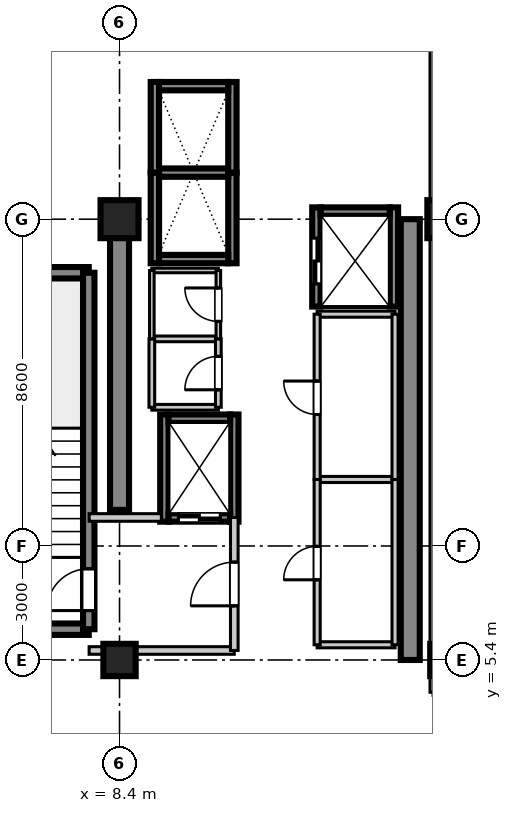
"""IFC4 building model, lengths in metres.
Left out: names, types, materials, properties, quantities, classifications, styles, units other than length and angle.
Written with IfcOpenShell. Run it as: python <this file> out.ifc"""

import sys

from ifc_helpers import new_model, si_unit, direction, frame, frame_2d, origin, origin_2d, place, context, subcontext, project, spatial, rectangle, extrude, source, transform, mapped, element, fill, save


model = new_model("IFC4")
c1 = context("Model", 3, precision=1e-05, world=origin(), true_north=direction((0.0, 1.0)))
c2 = subcontext(c1, "Body", "Model", "MODEL_VIEW")
j1 = project(units=[si_unit("LENGTHUNIT", "METRE"), si_unit("PLANEANGLEUNIT", "RADIAN")], contexts=[c1])
p1 = place(None, origin())
s1 = spatial("IfcSite", under=j1, at=p1, CompositionType="ELEMENT")
p2 = place(p1, origin())
s2 = spatial("IfcBuilding", under=s1, at=p2, CompositionType="ELEMENT")
p3 = place(p2, frame((0.0, 0.0, 219.7)))
s3 = spatial("IfcBuildingStorey", under=s2, at=p3, CompositionType="ELEMENT", Elevation=219.7)
m1 = source(origin(), c2, "Body", "SweptSolid", [
    extrude(rectangle(XDim=0.85, YDim=0.85, at=origin_2d()), origin(), (0.0, 0.0, 1.0), 3.655),
])
p4 = place(p3, frame((8.4, 5.4, 0.0), z_axis=(0.0, 0.0, 1.0), x_axis=(1.0, 0.0, 0.0)))
e1 = element("IfcColumn", 1, at=p4, inside=s3, PredefinedType="PILASTER", context=c2, shape_type="MappedRepresentation", body=[
    mapped(m1, transform((0.0, 0.0, 0.0), scale=1.0)),
])
m2 = source(origin(), c2, "Body", "SweptSolid", [
    extrude(rectangle(XDim=1.0, YDim=1.0, at=origin_2d()), origin(), (0.0, 0.0, 1.0), 3.655),
])
p5 = place(p3, frame((8.4, 17.0, 0.0), z_axis=(0.0, 0.0, 1.0), x_axis=(1.0, 0.0, 0.0)))
e2 = element("IfcColumn", 2, at=p5, inside=s3, PredefinedType="COLUMN", context=c2, shape_type="MappedRepresentation", body=[
    mapped(m2, transform((0.0, 0.0, 0.0), scale=1.0)),
])
p6 = place(p3, frame((17.0, 5.4, 0.0), z_axis=(0.0, 0.0, 1.0), x_axis=(1.0, 0.0, 0.0)))
e3 = element("IfcColumn", 3, at=p6, inside=s3, PredefinedType="PILASTER", context=c2, shape_type="MappedRepresentation", body=[
    mapped(m1, transform((0.0, 0.0, 0.0), scale=1.0)),
])
p7 = place(p3, frame((17.0, 17.0, 0.0), z_axis=(0.0, 0.0, 1.0), x_axis=(1.0, 0.0, 0.0)))
e4 = element("IfcColumn", 4, at=p7, inside=s3, PredefinedType="COLUMN", context=c2, shape_type="MappedRepresentation", body=[
    mapped(m2, transform((0.0, 0.0, 0.0), scale=1.0)),
])
m3 = source(origin(), c2, "Body", "SweptSolid", [
    extrude(rectangle(XDim=7.65, YDim=0.5, at=frame_2d((3.825, 0.0))), origin(), (0.0, 0.0, 1.0), 3.41),
])
p8 = place(p3, frame((8.4, 9.35, 0.0), z_axis=(0.0, 0.0, 1.0), x_axis=(0.0, 1.0, 0.0)))
e5 = element("IfcWall", 5, at=p8, inside=s3, PredefinedType="SHEAR", context=c2, shape_type="MappedRepresentation", body=[
    mapped(m3, transform((0.0, 0.0, 0.0), scale=1.0)),
])
m4 = source(origin(), c2, "Body", "SweptSolid", [
    extrude(rectangle(XDim=11.6, YDim=0.5, at=frame_2d((5.8, 0.0))), origin(), (0.0, 0.0, 1.0), 3.41),
])
p9 = place(p3, frame((16.05, 5.4, 0.0), z_axis=(0.0, 0.0, 1.0), x_axis=(0.0, 1.0, 0.0)))
e6 = element("IfcWall", 6, at=p9, inside=s3, PredefinedType="SHEAR", context=c2, shape_type="MappedRepresentation", body=[
    mapped(m4, transform((0.0, 0.0, 0.0), scale=1.0)),
])
m5 = source(origin(), c2, "Body", "SweptSolid", [
    extrude(rectangle(XDim=3.98, YDim=0.3, at=frame_2d((1.99, 0.0))), origin(), (0.0, 0.0, 1.0), 3.41),
])
for number, where, z_axis, x_axis in (
    (7, (3.61, 6.21, 0.0), (0.0, 0.0, 1.0), (1.0, 0.0, 0.0)),
    (8, (3.61, 15.59, 0.0), (0.0, 0.0, 1.0), (1.0, 0.0, 0.0)),
):
    element("IfcWall", number, at=place(p3, frame(where, z_axis=z_axis, x_axis=x_axis)), inside=s3, PredefinedType="SHEAR", context=c2, shape_type="MappedRepresentation", body=[
        mapped(m5, transform((0.0, 0.0, 0.0), scale=1.0)),
    ])
m6 = source(origin(), c2, "Body", "SweptSolid", [
    extrude(rectangle(XDim=9.38, YDim=0.3, at=frame_2d((4.69, 0.0))), origin(), (0.0, 0.0, 1.0), 3.41),
])
p10 = place(p3, frame((7.59, 6.21, 0.0), z_axis=(0.0, 0.0, 1.0), x_axis=(0.0, 1.0, 0.0)))
e9 = element("IfcWall", 9, at=p10, inside=s3, PredefinedType="SHEAR", context=c2, shape_type="MappedRepresentation", body=[
    mapped(m6, transform((0.0, 0.0, 0.0), scale=1.0)),
])
p11 = place(p10, frame((0.49, 0.0, 0.0)))
e10 = element("IfcOpeningElement", 10, at=p11, cuts=e9, PredefinedType="OPENING", context=c2, shape_type="SweptSolid", body=[
    extrude(rectangle(XDim=1.1, YDim=2.15, at=frame_2d((0.55, 1.075))), frame((0.0, 0.16, 0.0), z_axis=(0.0, -1.0, 0.0), x_axis=(1.0, 0.0, 0.0)), (0.0, 0.0, 1.0), 0.32),
])
m7 = source(origin(), c2, "Body", "SweptSolid", [
    extrude(rectangle(XDim=2.385, YDim=0.22, at=frame_2d((1.192, 0.0))), origin(), (0.0, 0.0, 1.0), 3.41),
])
for number, where, z_axis, x_axis in (
    (11, (9.33, 15.84, 0.0), (0.0, 0.0, 1.0), (0.0, 1.0, 0.0)),
    (12, (11.37, 15.84, 0.0), (0.0, 0.0, 1.0), (0.0, 1.0, 0.0)),
):
    element("IfcWall", number, at=place(p3, frame(where, z_axis=z_axis, x_axis=x_axis)), inside=s3, PredefinedType="SHEAR", context=c2, shape_type="MappedRepresentation", body=[
        mapped(m7, transform((0.0, 0.0, 0.0), scale=1.0)),
    ])
m8 = source(origin(), c2, "Body", "SweptSolid", [
    extrude(rectangle(XDim=1.82, YDim=0.22, at=frame_2d((0.91, 0.0))), origin(), (0.0, 0.0, 1.0), 3.41),
])
p12 = place(p3, frame((9.44, 15.95, 0.0), z_axis=(0.0, 0.0, 1.0), x_axis=(1.0, 0.0, 0.0)))
e13 = element("IfcWall", 13, at=p12, inside=s3, PredefinedType="SHEAR", context=c2, shape_type="MappedRepresentation", body=[
    mapped(m8, transform((0.0, 0.0, 0.0), scale=1.0)),
])
m9 = source(origin(), c2, "Body", "SweptSolid", [
    extrude(rectangle(XDim=1.82, YDim=0.22, at=frame_2d((0.91, 0.0))), origin(), (0.0, 0.0, 1.0), 3.7),
])
p13 = place(p3, frame((9.44, 18.225, 0.0), z_axis=(0.0, 0.0, 1.0), x_axis=(1.0, 0.0, 0.0)))
e14 = element("IfcWall", 14, at=p13, inside=s3, PredefinedType="SHEAR", context=c2, shape_type="MappedRepresentation", body=[
    mapped(m9, transform((0.0, 0.0, 0.0), scale=1.0)),
])
for number, where, z_axis, x_axis in (
    (15, (9.33, 18.225, 0.0), (0.0, 0.0, 1.0), (0.0, 1.0, 0.0)),
    (16, (11.37, 18.225, 0.0), (0.0, 0.0, 1.0), (0.0, 1.0, 0.0)),
):
    element("IfcWall", number, at=place(p3, frame(where, z_axis=z_axis, x_axis=x_axis)), inside=s3, PredefinedType="SHEAR", context=c2, shape_type="MappedRepresentation", body=[
        mapped(m7, transform((0.0, 0.0, 0.0), scale=1.0)),
    ])
p14 = place(p3, frame((9.44, 20.5, 0.0), z_axis=(0.0, 0.0, 1.0), x_axis=(1.0, 0.0, 0.0)))
e17 = element("IfcWall", 17, at=p14, inside=s3, PredefinedType="SHEAR", context=c2, shape_type="MappedRepresentation", body=[
    mapped(m8, transform((0.0, 0.0, 0.0), scale=1.0)),
])
m10 = source(origin(), c2, "Body", "SweptSolid", [
    extrude(rectangle(XDim=2.82, YDim=0.22, at=frame_2d((1.41, 0.0))), origin(), (0.0, 0.0, 1.0), 3.41),
])
for number, where, z_axis, x_axis in (
    (18, (9.58, 9.04, 0.0), (0.0, 0.0, 1.0), (0.0, 1.0, 0.0)),
    (19, (11.42, 9.04, 0.0), (0.0, 0.0, 1.0), (0.0, 1.0, 0.0)),
):
    element("IfcWall", number, at=place(p3, frame(where, z_axis=z_axis, x_axis=x_axis)), inside=s3, PredefinedType="SHEAR", context=c2, shape_type="MappedRepresentation", body=[
        mapped(m10, transform((0.0, 0.0, 0.0), scale=1.0)),
    ])
m11 = source(origin(), c2, "Body", "SweptSolid", [
    extrude(rectangle(XDim=1.62, YDim=0.22, at=frame_2d((0.81, 0.0))), origin(), (0.0, 0.0, 1.0), 3.41),
])
p15 = place(p3, frame((9.69, 9.15, 0.0), z_axis=(0.0, 0.0, 1.0), x_axis=(1.0, 0.0, 0.0)))
e20 = element("IfcWall", 20, at=p15, inside=s3, PredefinedType="SHEAR", context=c2, shape_type="MappedRepresentation", body=[
    mapped(m11, transform((0.0, 0.0, 0.0), scale=1.0)),
])
p16 = place(p15, frame((0.26, 0.0, 0.0)))
e21 = element("IfcOpeningElement", 21, at=p16, cuts=e20, PredefinedType="OPENING", context=c2, shape_type="SweptSolid", body=[
    extrude(rectangle(XDim=1.1, YDim=2.2, at=frame_2d((0.55, 1.1))), frame((0.0, 0.12, 0.0), z_axis=(0.0, -1.0, 0.0), x_axis=(1.0, 0.0, 0.0)), (0.0, 0.0, 1.0), 0.24),
])
p17 = place(p3, frame((9.69, 11.75, 0.0), z_axis=(0.0, 0.0, 1.0), x_axis=(1.0, 0.0, 0.0)))
e22 = element("IfcWall", 22, at=p17, inside=s3, PredefinedType="SHEAR", context=c2, shape_type="MappedRepresentation", body=[
    mapped(m11, transform((0.0, 0.0, 0.0), scale=1.0)),
])
m12 = source(origin(), c2, "Body", "SweptSolid", [
    extrude(rectangle(XDim=2.61, YDim=0.22, at=frame_2d((1.305, 0.0))), origin(), (0.0, 0.0, 1.0), 3.41),
])
p18 = place(p3, frame((13.58, 14.7, 0.0), z_axis=(0.0, 0.0, 1.0), x_axis=(0.0, 1.0, 0.0)))
e23 = element("IfcWall", 23, at=p18, inside=s3, PredefinedType="SHEAR", context=c2, shape_type="MappedRepresentation", body=[
    mapped(m12, transform((0.0, 0.0, 0.0), scale=1.0)),
])
p19 = place(p18, frame((0.6, 0.0, 0.0)))
e24 = element("IfcOpeningElement", 24, at=p19, cuts=e23, PredefinedType="OPENING", context=c2, shape_type="SweptSolid", body=[
    extrude(rectangle(XDim=1.2, YDim=2.2, at=frame_2d((0.6, 1.1))), frame((0.0, 0.12, 0.0), z_axis=(0.0, -1.0, 0.0), x_axis=(1.0, 0.0, 0.0)), (0.0, 0.0, 1.0), 0.24),
])
p20 = place(p3, frame((15.62, 14.7, 0.0), z_axis=(0.0, 0.0, 1.0), x_axis=(0.0, 1.0, 0.0)))
e25 = element("IfcWall", 25, at=p20, inside=s3, PredefinedType="SHEAR", context=c2, shape_type="MappedRepresentation", body=[
    mapped(m12, transform((0.0, 0.0, 0.0), scale=1.0)),
])
p21 = place(p3, frame((13.69, 17.2, 0.0), z_axis=(0.0, 0.0, 1.0), x_axis=(1.0, 0.0, 0.0)))
e26 = element("IfcWall", 26, at=p21, inside=s3, PredefinedType="SHEAR", context=c2, shape_type="MappedRepresentation", body=[
    mapped(m8, transform((0.0, 0.0, 0.0), scale=1.0)),
])
m13 = source(origin(), c2, "Body", "SweptSolid", [
    extrude(rectangle(XDim=3.82, YDim=0.2, at=frame_2d((1.91, 0.0))), origin(), (0.0, 0.0, 1.0), 2.75),
])
p22 = place(p3, frame((7.6, 5.65, 0.0), z_axis=(0.0, 0.0, 1.0), x_axis=(1.0, 0.0, 0.0)))
e27 = element("IfcWall", 27, at=p22, inside=s3, PredefinedType="PARTITIONING", context=c2, shape_type="MappedRepresentation", body=[
    mapped(m13, transform((0.0, 0.0, 0.0), scale=1.0)),
])
m14 = source(origin(), c2, "Body", "SweptSolid", [
    extrude(rectangle(XDim=1.9, YDim=0.2, at=frame_2d((0.95, 0.0))), origin(), (0.0, 0.0, 1.0), 2.75),
])
p23 = place(p3, frame((7.6, 9.15, 0.0), z_axis=(0.0, 0.0, 1.0), x_axis=(1.0, 0.0, 0.0)))
e28 = element("IfcWall", 28, at=p23, inside=s3, PredefinedType="PARTITIONING", context=c2, shape_type="MappedRepresentation", body=[
    mapped(m14, transform((0.0, 0.0, 0.0), scale=1.0)),
])
m15 = source(origin(), c2, "Body", "SweptSolid", [
    extrude(rectangle(XDim=3.5, YDim=0.2, at=frame_2d((1.75, 0.0))), origin(), (0.0, 0.0, 1.0), 2.75),
])
p24 = place(p3, frame((11.42, 5.65, 0.0), z_axis=(0.0, 0.0, 1.0), x_axis=(0.0, 1.0, 0.0)))
e29 = element("IfcWall", 29, at=p24, inside=s3, PredefinedType="PARTITIONING", context=c2, shape_type="MappedRepresentation", body=[
    mapped(m15, transform((0.0, 0.0, 0.0), scale=1.0)),
])
p25 = place(p24, frame((1.175, 0.0, 0.0)))
e30 = element("IfcOpeningElement", 30, at=p25, cuts=e29, PredefinedType="OPENING", context=c2, shape_type="SweptSolid", body=[
    extrude(rectangle(XDim=1.15, YDim=2.15, at=frame_2d((0.575, 1.075))), frame((0.0, 0.11, 0.0), z_axis=(0.0, -1.0, 0.0), x_axis=(1.0, 0.0, 0.0)), (0.0, 0.0, 1.0), 0.22),
])
m16 = source(origin(), c2, "Body", "SweptSolid", [
    extrude(rectangle(XDim=1.75, YDim=0.15, at=frame_2d((0.875, 0.0))), origin(), (0.0, 0.0, 1.0), 2.75),
])
for number, where, z_axis, x_axis in (
    (31, (9.25, 12.05, 0.0), (0.0, 0.0, 1.0), (1.0, 0.0, 0.0)),
    (32, (9.25, 13.85, 0.0), (0.0, 0.0, 1.0), (1.0, 0.0, 0.0)),
):
    element("IfcWall", number, at=place(p3, frame(where, z_axis=z_axis, x_axis=x_axis)), inside=s3, PredefinedType="PARTITIONING", context=c2, shape_type="MappedRepresentation", body=[
        mapped(m16, transform((0.0, 0.0, 0.0), scale=1.0)),
    ])
m17 = source(origin(), c2, "Body", "SweptSolid", [
    extrude(rectangle(XDim=1.8, YDim=0.15, at=frame_2d((0.9, 0.0))), origin(), (0.0, 0.0, 1.0), 2.75),
])
p26 = place(p3, frame((9.25, 12.05, 0.0), z_axis=(0.0, 0.0, 1.0), x_axis=(0.0, 1.0, 0.0)))
e33 = element("IfcWall", 33, at=p26, inside=s3, PredefinedType="PARTITIONING", context=c2, shape_type="MappedRepresentation", body=[
    mapped(m17, transform((0.0, 0.0, 0.0), scale=1.0)),
])
p27 = place(p3, frame((11.0, 12.05, 0.0), z_axis=(0.0, 0.0, 1.0), x_axis=(0.0, 1.0, 0.0)))
e34 = element("IfcWall", 34, at=p27, inside=s3, PredefinedType="PARTITIONING", context=c2, shape_type="MappedRepresentation", body=[
    mapped(m17, transform((0.0, 0.0, 0.0), scale=1.0)),
])
p28 = place(p27, frame((0.46, 0.0, 0.0)))
e35 = element("IfcOpeningElement", 35, at=p28, cuts=e34, PredefinedType="OPENING", context=c2, shape_type="SweptSolid", body=[
    extrude(rectangle(XDim=0.88, YDim=2.1, at=frame_2d((0.44, 1.05))), frame((0.0, 0.085, 0.0), z_axis=(0.0, -1.0, 0.0), x_axis=(1.0, 0.0, 0.0)), (0.0, 0.0, 1.0), 0.17),
])
m18 = source(origin(), c2, "Body", "SweptSolid", [
    extrude(rectangle(XDim=1.75, YDim=0.12, at=frame_2d((0.875, 0.0))), origin(), (0.0, 0.0, 1.0), 2.75),
])
p29 = place(p3, frame((9.25, 15.65, 0.0), z_axis=(0.0, 0.0, 1.0), x_axis=(1.0, 0.0, 0.0)))
e36 = element("IfcWall", 36, at=p29, inside=s3, PredefinedType="PARTITIONING", context=c2, shape_type="MappedRepresentation", body=[
    mapped(m18, transform((0.0, 0.0, 0.0), scale=1.0)),
])
m19 = source(origin(), c2, "Body", "SweptSolid", [
    extrude(rectangle(XDim=1.8, YDim=0.12, at=frame_2d((0.9, 0.0))), origin(), (0.0, 0.0, 1.0), 2.75),
])
p30 = place(p3, frame((9.25, 13.85, 0.0), z_axis=(0.0, 0.0, 1.0), x_axis=(0.0, 1.0, 0.0)))
e37 = element("IfcWall", 37, at=p30, inside=s3, PredefinedType="PARTITIONING", context=c2, shape_type="MappedRepresentation", body=[
    mapped(m19, transform((0.0, 0.0, 0.0), scale=1.0)),
])
p31 = place(p3, frame((11.0, 13.85, 0.0), z_axis=(0.0, 0.0, 1.0), x_axis=(0.0, 1.0, 0.0)))
e38 = element("IfcWall", 38, at=p31, inside=s3, PredefinedType="PARTITIONING", context=c2, shape_type="MappedRepresentation", body=[
    mapped(m19, transform((0.0, 0.0, 0.0), scale=1.0)),
])
p32 = place(p31, frame((0.46, 0.0, 0.0)))
e39 = element("IfcOpeningElement", 39, at=p32, cuts=e38, PredefinedType="OPENING", context=c2, shape_type="SweptSolid", body=[
    extrude(rectangle(XDim=0.88, YDim=2.1, at=frame_2d((0.44, 1.05))), frame((0.0, 0.07, 0.0), z_axis=(0.0, -1.0, 0.0), x_axis=(1.0, 0.0, 0.0)), (0.0, 0.0, 1.0), 0.14),
])
m20 = source(origin(), c2, "Body", "SweptSolid", [
    extrude(rectangle(XDim=2.05, YDim=0.16, at=frame_2d((1.025, 0.0))), origin(), (0.0, 0.0, 1.0), 2.75),
])
for number, where, z_axis, x_axis in (
    (40, (13.6, 5.8, 0.0), (0.0, 0.0, 1.0), (1.0, 0.0, 0.0)),
    (41, (13.6, 10.15, 0.0), (0.0, 0.0, 1.0), (1.0, 0.0, 0.0)),
):
    element("IfcWall", number, at=place(p3, frame(where, z_axis=z_axis, x_axis=x_axis)), inside=s3, PredefinedType="PARTITIONING", context=c2, shape_type="MappedRepresentation", body=[
        mapped(m20, transform((0.0, 0.0, 0.0), scale=1.0)),
    ])
m21 = source(origin(), c2, "Body", "SweptSolid", [
    extrude(rectangle(XDim=4.35, YDim=0.16, at=frame_2d((2.175, 0.0))), origin(), (0.0, 0.0, 1.0), 2.75),
])
p33 = place(p3, frame((13.6, 5.8, 0.0), z_axis=(0.0, 0.0, 1.0), x_axis=(0.0, 1.0, 0.0)))
e42 = element("IfcWall", 42, at=p33, inside=s3, PredefinedType="PARTITIONING", context=c2, shape_type="MappedRepresentation", body=[
    mapped(m21, transform((0.0, 0.0, 0.0), scale=1.0)),
])
p34 = place(p33, frame((1.71, 0.0, 0.0)))
e43 = element("IfcOpeningElement", 43, at=p34, cuts=e42, PredefinedType="OPENING", context=c2, shape_type="SweptSolid", body=[
    extrude(rectangle(XDim=0.88, YDim=2.1, at=frame_2d((0.44, 1.05))), frame((0.0, 0.09, 0.0), z_axis=(0.0, -1.0, 0.0), x_axis=(1.0, 0.0, 0.0)), (0.0, 0.0, 1.0), 0.18),
])
p35 = place(p3, frame((15.65, 5.8, 0.0), z_axis=(0.0, 0.0, 1.0), x_axis=(0.0, 1.0, 0.0)))
e44 = element("IfcWall", 44, at=p35, inside=s3, PredefinedType="PARTITIONING", context=c2, shape_type="MappedRepresentation", body=[
    mapped(m21, transform((0.0, 0.0, 0.0), scale=1.0)),
])
p36 = place(p3, frame((13.6, 14.5, 0.0), z_axis=(0.0, 0.0, 1.0), x_axis=(1.0, 0.0, 0.0)))
e45 = element("IfcWall", 45, at=p36, inside=s3, PredefinedType="PARTITIONING", context=c2, shape_type="MappedRepresentation", body=[
    mapped(m20, transform((0.0, 0.0, 0.0), scale=1.0)),
])
m22 = source(origin(), c2, "Body", "SweptSolid", [
    extrude(rectangle(XDim=4.35, YDim=0.16, at=frame_2d((2.175, 0.0))), origin(), (0.0, 0.0, 1.0), 2.75),
])
p37 = place(p3, frame((13.6, 10.15, 0.0), z_axis=(0.0, 0.0, 1.0), x_axis=(0.0, 1.0, 0.0)))
e46 = element("IfcWall", 46, at=p37, inside=s3, PredefinedType="PARTITIONING", context=c2, shape_type="MappedRepresentation", body=[
    mapped(m22, transform((0.0, 0.0, 0.0), scale=1.0)),
])
p38 = place(p37, frame((1.71, 0.0, 0.0)))
e47 = element("IfcOpeningElement", 47, at=p38, cuts=e46, PredefinedType="OPENING", context=c2, shape_type="SweptSolid", body=[
    extrude(rectangle(XDim=0.88, YDim=2.1, at=frame_2d((0.44, 1.05))), frame((0.0, 0.09, 0.0), z_axis=(0.0, -1.0, 0.0), x_axis=(1.0, 0.0, 0.0)), (0.0, 0.0, 1.0), 0.18),
])
p39 = place(p3, frame((15.65, 10.15, 0.0), z_axis=(0.0, 0.0, 1.0), x_axis=(0.0, 1.0, 0.0)))
e48 = element("IfcWall", 48, at=p39, inside=s3, PredefinedType="PARTITIONING", context=c2, shape_type="MappedRepresentation", body=[
    mapped(m22, transform((0.0, 0.0, 0.0), scale=1.0)),
])
m23 = source(origin(), c2, "Body", "SweptSolid", [
    extrude(rectangle(XDim=19.35, YDim=0.16, at=frame_2d((9.675, 0.0))), origin(), (0.0, 0.0, 1.0), 2.75),
])
p40 = place(p3, frame((16.65, 4.55, 0.0), z_axis=(0.0, 0.0, 1.0), x_axis=(0.0, 1.0, 0.0)))
e49 = element("IfcWall", 49, at=p40, inside=s3, PredefinedType="PARTITIONING", context=c2, shape_type="MappedRepresentation", body=[
    mapped(m23, transform((0.0, 0.0, 0.0), scale=1.0)),
])
m24 = source(origin(), c2, "Body", "SweptSolid", [
    extrude(rectangle(XDim=1.1, YDim=2.15, at=frame_2d((0.55, 1.075))), frame((0.0, 0.025, 0.0), z_axis=(0.0, -1.0, 0.0), x_axis=(1.0, 0.0, 0.0)), (0.0, 0.0, 1.0), 0.05),
])
p41 = place(p11, origin())
e50 = element("IfcDoor", 50, at=p41, inside=s3, OperationType="SINGLE_SWING_LEFT", PredefinedType="DOOR", context=c2, shape_type="MappedRepresentation", body=[
    mapped(m24, transform((0.0, 0.0, 0.0), scale=1.0)),
])
fill(e10, e50)
m25 = source(origin(), c2, "Body", "SweptSolid", [
    extrude(rectangle(XDim=1.1, YDim=2.2, at=frame_2d((0.55, 1.1))), frame((0.0, 0.025, 0.0), z_axis=(0.0, -1.0, 0.0), x_axis=(1.0, 0.0, 0.0)), (0.0, 0.0, 1.0), 0.05),
])
p42 = place(p16, frame((1.1, 0.0, 0.0), z_axis=(0.0, 0.0, 1.0), x_axis=(-1.0, 0.0, 0.0)))
e51 = element("IfcDoor", 51, at=p42, inside=s3, OperationType="DOUBLE_DOOR_SLIDING", PredefinedType="DOOR", context=c2, shape_type="MappedRepresentation", body=[
    mapped(m25, transform((0.0, 0.0, 0.0), scale=1.0)),
])
fill(e21, e51)
m26 = source(origin(), c2, "Body", "SweptSolid", [
    extrude(rectangle(XDim=1.2, YDim=2.2, at=frame_2d((0.6, 1.1))), frame((0.0, 0.025, 0.0), z_axis=(0.0, -1.0, 0.0), x_axis=(1.0, 0.0, 0.0)), (0.0, 0.0, 1.0), 0.05),
])
p43 = place(p19, origin())
e52 = element("IfcDoor", 52, at=p43, inside=s3, OperationType="DOUBLE_DOOR_SLIDING", PredefinedType="DOOR", context=c2, shape_type="MappedRepresentation", body=[
    mapped(m26, transform((0.0, 0.0, 0.0), scale=1.0)),
])
fill(e24, e52)
m27 = source(origin(), c2, "Body", "SweptSolid", [
    extrude(rectangle(XDim=1.15, YDim=2.15, at=frame_2d((0.575, 1.075))), frame((0.0, 0.025, 0.0), z_axis=(0.0, -1.0, 0.0), x_axis=(1.0, 0.0, 0.0)), (0.0, 0.0, 1.0), 0.05),
])
p44 = place(p25, frame((1.15, 0.0, 0.0), z_axis=(0.0, 0.0, 1.0), x_axis=(-1.0, 0.0, 0.0)))
e53 = element("IfcDoor", 53, at=p44, inside=s3, OperationType="SINGLE_SWING_LEFT", PredefinedType="DOOR", context=c2, shape_type="MappedRepresentation", body=[
    mapped(m27, transform((0.0, 0.0, 0.0), scale=1.0)),
])
fill(e30, e53)
m28 = source(origin(), c2, "Body", "SweptSolid", [
    extrude(rectangle(XDim=0.88, YDim=2.1, at=frame_2d((0.44, 1.05))), frame((0.0, 0.025, 0.0), z_axis=(0.0, -1.0, 0.0), x_axis=(1.0, 0.0, 0.0)), (0.0, 0.0, 1.0), 0.05),
])
p45 = place(p28, origin())
e54 = element("IfcDoor", 54, at=p45, inside=s3, OperationType="SINGLE_SWING_LEFT", PredefinedType="DOOR", context=c2, shape_type="MappedRepresentation", body=[
    mapped(m28, transform((0.0, 0.0, 0.0), scale=1.0)),
])
fill(e35, e54)
p46 = place(p32, origin())
e55 = element("IfcDoor", 55, at=p46, inside=s3, OperationType="SINGLE_SWING_RIGHT", PredefinedType="DOOR", context=c2, shape_type="MappedRepresentation", body=[
    mapped(m28, transform((0.0, 0.0, 0.0), scale=1.0)),
])
fill(e39, e55)
p47 = place(p34, frame((0.88, 0.0, 0.0), z_axis=(0.0, 0.0, 1.0), x_axis=(-1.0, 0.0, 0.0)))
e56 = element("IfcDoor", 56, at=p47, inside=s3, OperationType="SINGLE_SWING_LEFT", PredefinedType="DOOR", context=c2, shape_type="MappedRepresentation", body=[
    mapped(m28, transform((0.0, 0.0, 0.0), scale=1.0)),
])
fill(e43, e56)
p48 = place(p38, frame((0.88, 0.0, 0.0), z_axis=(0.0, 0.0, 1.0), x_axis=(-1.0, 0.0, 0.0)))
e57 = element("IfcDoor", 57, at=p48, inside=s3, OperationType="SINGLE_SWING_RIGHT", PredefinedType="DOOR", context=c2, shape_type="MappedRepresentation", body=[
    mapped(m28, transform((0.0, 0.0, 0.0), scale=1.0)),
])
fill(e47, e57)
save(model, sys.argv[1])
